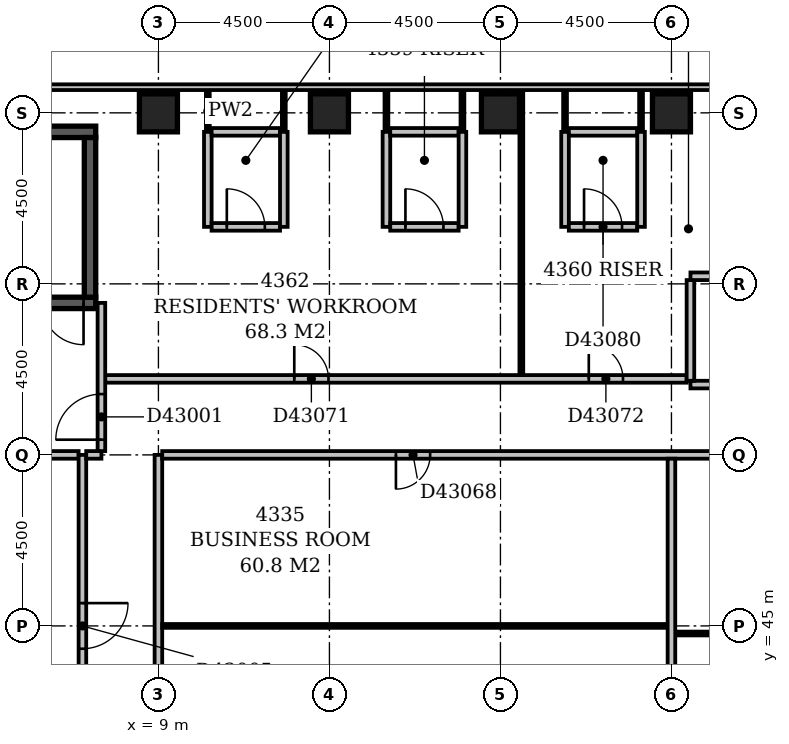
"""IFC4 building model, lengths in metres.
Left out: names, types, materials, properties, quantities, classifications, styles, units other than length and angle.
Written with IfcOpenShell. Run it as: python <this file> out.ifc"""

import sys

from ifc_helpers import new_model, si_unit, direction, frame, frame_2d, origin, origin_2d, place, context, subcontext, project, spatial, rectangle, extrude, element, fill, save


model = new_model("IFC4")
c1 = context("Model", 3, precision=1e-05, world=origin(), true_north=direction((0.0, 1.0)))
c2 = subcontext(c1, "Body", "Model", "MODEL_VIEW")
j1 = project(units=[si_unit("LENGTHUNIT", "METRE"), si_unit("PLANEANGLEUNIT", "RADIAN")], contexts=[c1])
p1 = place(None, origin())
s1 = spatial("IfcSite", under=j1, at=p1, CompositionType="ELEMENT")
p2 = place(p1, origin())
s2 = spatial("IfcBuilding", under=s1, at=p2, CompositionType="ELEMENT")
p3 = place(p2, frame((0.0, 0.0, 170.0)))
s3 = spatial("IfcBuildingStorey", under=s2, at=p3, CompositionType="ELEMENT", Elevation=170.0)
p4 = place(p3, frame((0.35, 53.5, -0.3), z_axis=(0.0, 0.0, 1.0), x_axis=(1.0, 0.0, 0.0)))
e1 = element("IfcWall", 1, at=p4, inside=s3, PredefinedType="SHEAR", context=c2, shape_type="SweptSolid", body=[
    extrude(rectangle(XDim=7.0, YDim=0.3, at=frame_2d((3.5, 0.0))), origin(), (0.0, 0.0, 1.0), 3.45),
])
p5 = place(p4, frame((5.58, 0.0, 0.3)))
e2 = element("IfcOpeningElement", 2, at=p5, cuts=e1, PredefinedType="OPENING", context=c2, shape_type="SweptSolid", body=[
    extrude(rectangle(XDim=1.1, YDim=2.1, at=frame_2d((0.55, 1.05))), frame((0.0, 0.162, 0.0), z_axis=(0.0, -1.0, 0.0), x_axis=(1.0, 0.0, 0.0)), (0.0, 0.0, 1.0), 0.324),
])
p6 = place(p3, frame((0.35, 58.0, -0.3), z_axis=(0.0, 0.0, 1.0), x_axis=(1.0, 0.0, 0.0)))
e3 = element("IfcWall", 3, at=p6, inside=s3, PredefinedType="SHEAR", context=c2, shape_type="SweptSolid", body=[
    extrude(rectangle(XDim=7.0, YDim=0.3, at=frame_2d((3.5, 0.0))), origin(), (0.0, 0.0, 1.0), 3.45),
])
p7 = place(p3, frame((7.2, 53.65, -0.3), z_axis=(0.0, 0.0, 1.0), x_axis=(0.0, 1.0, 0.0)))
e4 = element("IfcWall", 4, at=p7, inside=s3, PredefinedType="SHEAR", context=c2, shape_type="SweptSolid", body=[
    extrude(rectangle(XDim=4.2, YDim=0.3, at=frame_2d((2.1, 0.0))), origin(), (0.0, 0.0, 1.0), 3.45),
])
for number, where, z_axis, x_axis in (
    (5, (9.0, 58.5, -0.3), (0.0, 0.0, 1.0), (1.0, 0.0, 0.0)),
    (6, (13.5, 58.5, -0.3), (0.0, 0.0, 1.0), (1.0, 0.0, 0.0)),
    (7, (18.0, 58.5, -0.3), (0.0, 0.0, 1.0), (1.0, 0.0, 0.0)),
    (8, (22.5, 58.5, -0.3), (0.0, 0.0, 1.0), (1.0, 0.0, 0.0)),
):
    element("IfcColumn", number, at=place(p3, frame(where, z_axis=z_axis, x_axis=x_axis)), inside=s3, PredefinedType="COLUMN", context=c2, shape_type="SweptSolid", body=[
        extrude(rectangle(XDim=1.0, YDim=1.0, at=origin_2d()), origin(), (0.0, 0.0, 1.0), 3.45),
    ])
p8 = place(p3, frame((68.1, 59.175, 0.0), z_axis=(0.0, 0.0, 1.0), x_axis=(-1.0, 0.0, 0.0)))
e9 = element("IfcWall", 9, at=p8, inside=s3, PredefinedType="STANDARD", context=c2, shape_type="SweptSolid", body=[
    extrude(rectangle(XDim=68.85, YDim=0.15, at=frame_2d((34.425, 0.0))), origin(), (0.0, 0.0, 1.0), 2.5),
])
p9 = place(p8, frame((1.65, 0.0, 0.6)))
e10 = element("IfcOpeningElement", 10, at=p9, cuts=e9, PredefinedType="OPENING", context=c2, shape_type="SweptSolid", body=[
    extrude(rectangle(XDim=2.4, YDim=1.8, at=frame_2d((1.2, 0.9))), frame((0.0, 0.087, 0.0), z_axis=(0.0, -1.0, 0.0), x_axis=(1.0, 0.0, 0.0)), (0.0, 0.0, 1.0), 0.174),
])
p10 = place(p8, frame((5.823, 0.0, 0.6)))
e11 = element("IfcOpeningElement", 11, at=p10, cuts=e9, PredefinedType="OPENING", context=c2, shape_type="SweptSolid", body=[
    extrude(rectangle(XDim=2.1, YDim=1.8, at=frame_2d((1.05, 0.9))), frame((0.0, 0.087, 0.0), z_axis=(0.0, -1.0, 0.0), x_axis=(1.0, 0.0, 0.0)), (0.0, 0.0, 1.0), 0.174),
])
p11 = place(p8, frame((20.277, 0.0, 0.6)))
e12 = element("IfcOpeningElement", 12, at=p11, cuts=e9, PredefinedType="OPENING", context=c2, shape_type="SweptSolid", body=[
    extrude(rectangle(XDim=2.1, YDim=1.8, at=frame_2d((1.05, 0.9))), frame((0.0, 0.087, 0.0), z_axis=(0.0, -1.0, 0.0), x_axis=(1.0, 0.0, 0.0)), (0.0, 0.0, 1.0), 0.174),
])
p12 = place(p3, frame((7.0, 34.6, 0.0), z_axis=(0.0, 0.0, 1.0), x_axis=(0.0, 1.0, 0.0)))
e13 = element("IfcWall", 13, at=p12, inside=s3, PredefinedType="PARTITIONING", context=c2, shape_type="SweptSolid", body=[
    extrude(rectangle(XDim=14.9, YDim=0.2, at=frame_2d((7.45, 0.0))), origin(), (0.0, 0.0, 1.0), 3.15),
])
p13 = place(p12, frame((2.8, 0.0, 0.0)))
e14 = element("IfcOpeningElement", 14, at=p13, cuts=e13, PredefinedType="OPENING", context=c2, shape_type="SweptSolid", body=[
    extrude(rectangle(XDim=1.2, YDim=2.1, at=frame_2d((0.6, 1.05))), frame((0.0, 0.112, 0.0), z_axis=(0.0, -1.0, 0.0), x_axis=(1.0, 0.0, 0.0)), (0.0, 0.0, 1.0), 0.224),
])
p14 = place(p12, frame((9.8, 0.0, 0.0)))
e15 = element("IfcOpeningElement", 15, at=p14, cuts=e13, PredefinedType="OPENING", context=c2, shape_type="SweptSolid", body=[
    extrude(rectangle(XDim=1.2, YDim=2.1, at=frame_2d((0.6, 1.05))), frame((0.0, 0.112, 0.0), z_axis=(0.0, -1.0, 0.0), x_axis=(1.0, 0.0, 0.0)), (0.0, 0.0, 1.0), 0.224),
])
p15 = place(p3, frame((4.6, 49.5, 0.0), z_axis=(0.0, 0.0, 1.0), x_axis=(1.0, 0.0, 0.0)))
e16 = element("IfcWall", 16, at=p15, inside=s3, PredefinedType="PARTITIONING", context=c2, shape_type="SweptSolid", body=[
    extrude(rectangle(XDim=2.3, YDim=0.2, at=frame_2d((1.15, 0.0))), origin(), (0.0, 0.0, 1.0), 3.15),
])
p16 = place(p3, frame((23.0, 51.35, 0.0), z_axis=(0.0, 0.0, 1.0), x_axis=(1.0, 0.0, 0.0)))
e17 = element("IfcWall", 17, at=p16, inside=s3, PredefinedType="PARTITIONING", context=c2, shape_type="SweptSolid", body=[
    extrude(rectangle(XDim=4.8, YDim=0.2, at=frame_2d((2.4, 0.0))), origin(), (0.0, 0.0, 1.0), 3.15),
])
p17 = place(p16, frame((1.65, 0.0, 0.0)))
e18 = element("IfcOpeningElement", 18, at=p17, cuts=e17, PredefinedType="OPENING", context=c2, shape_type="SweptSolid", body=[
    extrude(rectangle(XDim=1.2, YDim=2.1, at=frame_2d((0.6, 1.05))), frame((0.0, 0.112, 0.0), z_axis=(0.0, -1.0, 0.0), x_axis=(1.0, 0.0, 0.0)), (0.0, 0.0, 1.0), 0.224),
])
p18 = place(p3, frame((23.0, 54.2, 0.0), z_axis=(0.0, 0.0, 1.0), x_axis=(1.0, 0.0, 0.0)))
e19 = element("IfcWall", 19, at=p18, inside=s3, PredefinedType="PARTITIONING", context=c2, shape_type="SweptSolid", body=[
    extrude(rectangle(XDim=0.9, YDim=0.2, at=frame_2d((0.45, 0.0))), origin(), (0.0, 0.0, 1.0), 3.15),
])
p19 = place(p3, frame((23.0, 51.45, 0.0), z_axis=(0.0, 0.0, 1.0), x_axis=(0.0, 1.0, 0.0)))
e20 = element("IfcWall", 20, at=p19, inside=s3, PredefinedType="PARTITIONING", context=c2, shape_type="SweptSolid", body=[
    extrude(rectangle(XDim=2.65, YDim=0.2, at=frame_2d((1.325, 0.0))), origin(), (0.0, 0.0, 1.0), 3.15),
])
p20 = place(p3, frame((7.1, 49.5, 0.0), z_axis=(0.0, 0.0, 1.0), x_axis=(1.0, 0.0, 0.0)))
e21 = element("IfcWall", 21, at=p20, inside=s3, PredefinedType="PARTITIONING", context=c2, shape_type="SweptSolid", body=[
    extrude(rectangle(XDim=0.4, YDim=0.2, at=frame_2d((0.2, 0.0))), origin(), (0.0, 0.0, 1.0), 3.15),
])
p21 = place(p3, frame((7.5, 49.6, 0.0), z_axis=(0.0, 0.0, 1.0), x_axis=(0.0, 1.0, 0.0)))
e22 = element("IfcWall", 22, at=p21, inside=s3, PredefinedType="PARTITIONING", context=c2, shape_type="SweptSolid", body=[
    extrude(rectangle(XDim=3.9, YDim=0.2, at=frame_2d((1.95, 0.0))), origin(), (0.0, 0.0, 1.0), 3.15),
])
p22 = place(p21, frame((0.3, 0.0, 0.0)))
e23 = element("IfcOpeningElement", 23, at=p22, cuts=e22, PredefinedType="OPENING", context=c2, shape_type="SweptSolid", body=[
    extrude(rectangle(XDim=1.2, YDim=2.1, at=frame_2d((0.6, 1.05))), frame((0.0, 0.112, 0.0), z_axis=(0.0, -1.0, 0.0), x_axis=(1.0, 0.0, 0.0)), (0.0, 0.0, 1.0), 0.224),
])
p23 = place(p3, frame((9.0, 34.75, 0.0), z_axis=(0.0, 0.0, 1.0), x_axis=(0.0, 1.0, 0.0)))
e24 = element("IfcWall", 24, at=p23, inside=s3, PredefinedType="PARTITIONING", context=c2, shape_type="SweptSolid", body=[
    extrude(rectangle(XDim=14.75, YDim=0.2, at=frame_2d((7.375, 0.0))), origin(), (0.0, 0.0, 1.0), 3.15),
])
p24 = place(p23, frame((3.0, 0.0, 0.0)))
e25 = element("IfcOpeningElement", 25, at=p24, cuts=e24, PredefinedType="OPENING", context=c2, shape_type="SweptSolid", body=[
    extrude(rectangle(XDim=0.9, YDim=2.1, at=frame_2d((0.45, 1.05))), frame((0.0, 0.112, 0.0), z_axis=(0.0, -1.0, 0.0), x_axis=(1.0, 0.0, 0.0)), (0.0, 0.0, 1.0), 0.224),
])
p25 = place(p23, frame((7.5, 0.0, 0.0)))
e26 = element("IfcOpeningElement", 26, at=p25, cuts=e24, PredefinedType="OPENING", context=c2, shape_type="SweptSolid", body=[
    extrude(rectangle(XDim=0.9, YDim=2.1, at=frame_2d((0.45, 1.05))), frame((0.0, 0.112, 0.0), z_axis=(0.0, -1.0, 0.0), x_axis=(1.0, 0.0, 0.0)), (0.0, 0.0, 1.0), 0.224),
])
p26 = place(p3, frame((22.5, 36.5, 0.0), z_axis=(0.0, 0.0, 1.0), x_axis=(0.0, 1.0, 0.0)))
e27 = element("IfcWall", 27, at=p26, inside=s3, PredefinedType="PARTITIONING", context=c2, shape_type="SweptSolid", body=[
    extrude(rectangle(XDim=12.9, YDim=0.2, at=frame_2d((6.45, 0.0))), origin(), (0.0, 0.0, 1.0), 3.15),
])
p27 = place(p3, frame((22.6, 44.8, 0.0), z_axis=(0.0, 0.0, 1.0), x_axis=(1.0, 0.0, 0.0)))
e28 = element("IfcWall", 28, at=p27, inside=s3, PredefinedType="PARTITIONING", context=c2, shape_type="SweptSolid", body=[
    extrude(rectangle(XDim=6.75, YDim=0.1, at=frame_2d((3.375, 0.0))), origin(), (0.0, 0.0, 1.0), 3.15),
])
p28 = place(p27, frame((2.9, 0.0, 0.0)))
e29 = element("IfcOpeningElement", 29, at=p28, cuts=e28, PredefinedType="OPENING", context=c2, shape_type="SweptSolid", body=[
    extrude(rectangle(XDim=0.9, YDim=2.1, at=frame_2d((0.45, 1.05))), frame((0.0, 0.062, 0.0), z_axis=(0.0, -1.0, 0.0), x_axis=(1.0, 0.0, 0.0)), (0.0, 0.0, 1.0), 0.124),
])
p29 = place(p3, frame((9.1, 45.0, 0.0), z_axis=(0.0, 0.0, 1.0), x_axis=(1.0, 0.0, 0.0)))
e30 = element("IfcWall", 30, at=p29, inside=s3, PredefinedType="PARTITIONING", context=c2, shape_type="SweptSolid", body=[
    extrude(rectangle(XDim=13.3, YDim=0.1, at=frame_2d((6.65, 0.0))), origin(), (0.0, 0.0, 1.0), 3.15),
])
p30 = place(p3, frame((9.1, 49.5, 0.0), z_axis=(0.0, 0.0, 1.0), x_axis=(1.0, 0.0, 0.0)))
e31 = element("IfcWall", 31, at=p30, inside=s3, PredefinedType="PARTITIONING", context=c2, shape_type="SweptSolid", body=[
    extrude(rectangle(XDim=32.55, YDim=0.2, at=frame_2d((16.275, 0.0))), origin(), (0.0, 0.0, 1.0), 3.15),
])
p31 = place(p30, frame((20.6, 0.0, 0.0)))
e32 = element("IfcOpeningElement", 32, at=p31, cuts=e31, PredefinedType="OPENING", context=c2, shape_type="SweptSolid", body=[
    extrude(rectangle(XDim=1.0, YDim=2.1, at=frame_2d((0.5, 1.05))), frame((0.0, 0.112, 0.0), z_axis=(0.0, -1.0, 0.0), x_axis=(1.0, 0.0, 0.0)), (0.0, 0.0, 1.0), 0.224),
])
p32 = place(p30, frame((6.15, 0.0, 0.0)))
e33 = element("IfcOpeningElement", 33, at=p32, cuts=e31, PredefinedType="OPENING", context=c2, shape_type="SweptSolid", body=[
    extrude(rectangle(XDim=0.9, YDim=2.1, at=frame_2d((0.45, 1.05))), frame((0.0, 0.112, 0.0), z_axis=(0.0, -1.0, 0.0), x_axis=(1.0, 0.0, 0.0)), (0.0, 0.0, 1.0), 0.224),
])
p33 = place(p3, frame((7.6, 51.5, 0.0), z_axis=(0.0, 0.0, 1.0), x_axis=(1.0, 0.0, 0.0)))
e34 = element("IfcWall", 34, at=p33, inside=s3, PredefinedType="PARTITIONING", context=c2, shape_type="SweptSolid", body=[
    extrude(rectangle(XDim=15.3, YDim=0.2, at=frame_2d((7.65, 0.0))), origin(), (0.0, 0.0, 1.0), 3.15),
])
p34 = place(p33, frame((4.975, 0.0, 0.0)))
e35 = element("IfcOpeningElement", 35, at=p34, cuts=e34, PredefinedType="OPENING", context=c2, shape_type="SweptSolid", body=[
    extrude(rectangle(XDim=0.9, YDim=2.1, at=frame_2d((0.45, 1.05))), frame((0.0, 0.112, 0.0), z_axis=(0.0, -1.0, 0.0), x_axis=(1.0, 0.0, 0.0)), (0.0, 0.0, 1.0), 0.224),
])
p35 = place(p33, frame((12.725, 0.0, 0.0)))
e36 = element("IfcOpeningElement", 36, at=p35, cuts=e34, PredefinedType="OPENING", context=c2, shape_type="SweptSolid", body=[
    extrude(rectangle(XDim=0.9, YDim=2.1, at=frame_2d((0.45, 1.05))), frame((0.0, 0.112, 0.0), z_axis=(0.0, -1.0, 0.0), x_axis=(1.0, 0.0, 0.0)), (0.0, 0.0, 1.0), 0.224),
])
p36 = place(p3, frame((18.55, 51.6, 0.0), z_axis=(0.0, 0.0, 1.0), x_axis=(0.0, 1.0, 0.0)))
e37 = element("IfcWall", 37, at=p36, inside=s3, PredefinedType="PARTITIONING", context=c2, shape_type="SweptSolid", body=[
    extrude(rectangle(XDim=7.5, YDim=0.1, at=frame_2d((3.75, 0.0))), origin(), (0.0, 0.0, 1.0), 3.15),
])
p37 = place(p3, frame((10.3, 55.5, 0.0), z_axis=(0.0, 0.0, 1.0), x_axis=(0.0, 1.0, 0.0)))
e38 = element("IfcWall", 38, at=p37, inside=s3, PredefinedType="PARTITIONING", context=c2, shape_type="SweptSolid", body=[
    extrude(rectangle(XDim=2.5, YDim=0.2, at=frame_2d((1.25, 0.0))), origin(), (0.0, 0.0, 1.0), 3.15),
])
p38 = place(p3, frame((10.4, 55.5, 0.0), z_axis=(0.0, 0.0, 1.0), x_axis=(1.0, 0.0, 0.0)))
e39 = element("IfcWall", 39, at=p38, inside=s3, PredefinedType="PARTITIONING", context=c2, shape_type="SweptSolid", body=[
    extrude(rectangle(XDim=1.8, YDim=0.2, at=frame_2d((0.9, 0.0))), origin(), (0.0, 0.0, 1.0), 3.15),
])
p39 = place(p38, frame((0.4, 0.0, 0.0)))
e40 = element("IfcOpeningElement", 40, at=p39, cuts=e39, PredefinedType="OPENING", context=c2, shape_type="SweptSolid", body=[
    extrude(rectangle(XDim=1.0, YDim=2.1, at=frame_2d((0.5, 1.05))), frame((0.0, 0.112, 0.0), z_axis=(0.0, -1.0, 0.0), x_axis=(1.0, 0.0, 0.0)), (0.0, 0.0, 1.0), 0.224),
])
for number, where, z_axis, x_axis in (
    (41, (12.3, 55.5, 0.0), (0.0, 0.0, 1.0), (0.0, 1.0, 0.0)),
    (42, (15.0, 55.5, 0.0), (0.0, 0.0, 1.0), (0.0, 1.0, 0.0)),
):
    element("IfcWall", number, at=place(p3, frame(where, z_axis=z_axis, x_axis=x_axis)), inside=s3, PredefinedType="PARTITIONING", context=c2, shape_type="SweptSolid", body=[
        extrude(rectangle(XDim=2.5, YDim=0.2, at=frame_2d((1.25, 0.0))), origin(), (0.0, 0.0, 1.0), 3.15),
    ])
p40 = place(p3, frame((15.1, 55.5, 0.0), z_axis=(0.0, 0.0, 1.0), x_axis=(1.0, 0.0, 0.0)))
e43 = element("IfcWall", 43, at=p40, inside=s3, PredefinedType="PARTITIONING", context=c2, shape_type="SweptSolid", body=[
    extrude(rectangle(XDim=1.8, YDim=0.2, at=frame_2d((0.9, 0.0))), origin(), (0.0, 0.0, 1.0), 3.15),
])
p41 = place(p40, frame((0.4, 0.0, 0.0)))
e44 = element("IfcOpeningElement", 44, at=p41, cuts=e43, PredefinedType="OPENING", context=c2, shape_type="SweptSolid", body=[
    extrude(rectangle(XDim=1.0, YDim=2.1, at=frame_2d((0.5, 1.05))), frame((0.0, 0.112, 0.0), z_axis=(0.0, -1.0, 0.0), x_axis=(1.0, 0.0, 0.0)), (0.0, 0.0, 1.0), 0.224),
])
for number, where, z_axis, x_axis in (
    (45, (17.0, 55.5, 0.0), (0.0, 0.0, 1.0), (0.0, 1.0, 0.0)),
    (46, (19.7, 55.5, 0.0), (0.0, 0.0, 1.0), (0.0, 1.0, 0.0)),
):
    element("IfcWall", number, at=place(p3, frame(where, z_axis=z_axis, x_axis=x_axis)), inside=s3, PredefinedType="PARTITIONING", context=c2, shape_type="SweptSolid", body=[
        extrude(rectangle(XDim=2.5, YDim=0.2, at=frame_2d((1.25, 0.0))), origin(), (0.0, 0.0, 1.0), 3.15),
    ])
p42 = place(p3, frame((19.8, 55.5, 0.0), z_axis=(0.0, 0.0, 1.0), x_axis=(1.0, 0.0, 0.0)))
e47 = element("IfcWall", 47, at=p42, inside=s3, PredefinedType="PARTITIONING", context=c2, shape_type="SweptSolid", body=[
    extrude(rectangle(XDim=1.8, YDim=0.2, at=frame_2d((0.9, 0.0))), origin(), (0.0, 0.0, 1.0), 3.15),
])
p43 = place(p42, frame((0.4, 0.0, 0.0)))
e48 = element("IfcOpeningElement", 48, at=p43, cuts=e47, PredefinedType="OPENING", context=c2, shape_type="SweptSolid", body=[
    extrude(rectangle(XDim=1.0, YDim=2.1, at=frame_2d((0.5, 1.05))), frame((0.0, 0.112, 0.0), z_axis=(0.0, -1.0, 0.0), x_axis=(1.0, 0.0, 0.0)), (0.0, 0.0, 1.0), 0.224),
])
p44 = place(p3, frame((21.7, 55.5, 0.0), z_axis=(0.0, 0.0, 1.0), x_axis=(0.0, 1.0, 0.0)))
e49 = element("IfcWall", 49, at=p44, inside=s3, PredefinedType="PARTITIONING", context=c2, shape_type="SweptSolid", body=[
    extrude(rectangle(XDim=2.5, YDim=0.2, at=frame_2d((1.25, 0.0))), origin(), (0.0, 0.0, 1.0), 3.15),
])
p45 = place(p3, frame((10.3, 58.0, 0.0), z_axis=(0.0, 0.0, 1.0), x_axis=(0.0, 1.0, 0.0)))
e50 = element("IfcWall", 50, at=p45, inside=s3, PredefinedType="PARTITIONING", context=c2, shape_type="SweptSolid", body=[
    extrude(rectangle(XDim=1.1, YDim=0.1, at=frame_2d((0.55, 0.0))), origin(), (0.0, 0.0, 1.0), 3.15),
])
p46 = place(p3, frame((10.4, 58.0, 0.0), z_axis=(0.0, 0.0, 1.0), x_axis=(1.0, 0.0, 0.0)))
e51 = element("IfcWall", 51, at=p46, inside=s3, PredefinedType="PARTITIONING", context=c2, shape_type="SweptSolid", body=[
    extrude(rectangle(XDim=1.8, YDim=0.2, at=frame_2d((0.9, 0.0))), origin(), (0.0, 0.0, 1.0), 3.15),
])
for number, where, z_axis, x_axis in (
    (52, (12.3, 58.0, 0.0), (0.0, 0.0, 1.0), (0.0, 1.0, 0.0)),
    (53, (15.0, 58.0, 0.0), (0.0, 0.0, 1.0), (0.0, 1.0, 0.0)),
):
    element("IfcWall", number, at=place(p3, frame(where, z_axis=z_axis, x_axis=x_axis)), inside=s3, PredefinedType="PARTITIONING", context=c2, shape_type="SweptSolid", body=[
        extrude(rectangle(XDim=1.1, YDim=0.1, at=frame_2d((0.55, 0.0))), origin(), (0.0, 0.0, 1.0), 3.15),
    ])
p47 = place(p3, frame((15.1, 58.0, 0.0), z_axis=(0.0, 0.0, 1.0), x_axis=(1.0, 0.0, 0.0)))
e54 = element("IfcWall", 54, at=p47, inside=s3, PredefinedType="PARTITIONING", context=c2, shape_type="SweptSolid", body=[
    extrude(rectangle(XDim=1.8, YDim=0.2, at=frame_2d((0.9, 0.0))), origin(), (0.0, 0.0, 1.0), 3.15),
])
for number, where, z_axis, x_axis in (
    (55, (17.0, 58.0, 0.0), (0.0, 0.0, 1.0), (0.0, 1.0, 0.0)),
    (56, (19.7, 58.0, 0.0), (0.0, 0.0, 1.0), (0.0, 1.0, 0.0)),
):
    element("IfcWall", number, at=place(p3, frame(where, z_axis=z_axis, x_axis=x_axis)), inside=s3, PredefinedType="PARTITIONING", context=c2, shape_type="SweptSolid", body=[
        extrude(rectangle(XDim=1.1, YDim=0.1, at=frame_2d((0.55, 0.0))), origin(), (0.0, 0.0, 1.0), 3.15),
    ])
p48 = place(p3, frame((19.8, 58.0, 0.0), z_axis=(0.0, 0.0, 1.0), x_axis=(1.0, 0.0, 0.0)))
e57 = element("IfcWall", 57, at=p48, inside=s3, PredefinedType="PARTITIONING", context=c2, shape_type="SweptSolid", body=[
    extrude(rectangle(XDim=1.8, YDim=0.2, at=frame_2d((0.9, 0.0))), origin(), (0.0, 0.0, 1.0), 3.15),
])
p49 = place(p3, frame((21.7, 58.0, 0.0), z_axis=(0.0, 0.0, 1.0), x_axis=(0.0, 1.0, 0.0)))
e58 = element("IfcWall", 58, at=p49, inside=s3, PredefinedType="PARTITIONING", context=c2, shape_type="SweptSolid", body=[
    extrude(rectangle(XDim=1.1, YDim=0.1, at=frame_2d((0.55, 0.0))), origin(), (0.0, 0.0, 1.0), 3.15),
])
p50 = place(p22, origin())
e59 = element("IfcDoor", 59, at=p50, inside=s3, OperationType="SINGLE_SWING_LEFT", PredefinedType="DOOR", context=c2, shape_type="SweptSolid", body=[
    extrude(rectangle(XDim=1.2, YDim=2.1, at=frame_2d((0.6, 1.05))), frame((0.0, 0.025, 0.0), z_axis=(0.0, -1.0, 0.0), x_axis=(1.0, 0.0, 0.0)), (0.0, 0.0, 1.0), 0.05),
])
fill(e23, e59)
p51 = place(p14, origin())
e60 = element("IfcDoor", 60, at=p51, inside=s3, OperationType="SINGLE_SWING_RIGHT", PredefinedType="DOOR", context=c2, shape_type="SweptSolid", body=[
    extrude(rectangle(XDim=1.2, YDim=2.1, at=frame_2d((0.6, 1.05))), frame((0.0, 0.025, 0.0), z_axis=(0.0, -1.0, 0.0), x_axis=(1.0, 0.0, 0.0)), (0.0, 0.0, 1.0), 0.05),
])
fill(e15, e60)
p52 = place(p5, origin())
e61 = element("IfcDoor", 61, at=p52, inside=s3, OperationType="SINGLE_SWING_RIGHT", PredefinedType="DOOR", context=c2, shape_type="SweptSolid", body=[
    extrude(rectangle(XDim=1.1, YDim=2.1, at=frame_2d((0.55, 1.05))), frame((0.0, 0.025, 0.0), z_axis=(0.0, -1.0, 0.0), x_axis=(1.0, 0.0, 0.0)), (0.0, 0.0, 1.0), 0.05),
])
fill(e2, e61)
p53 = place(p32, frame((0.9, 0.0, 0.0), z_axis=(0.0, 0.0, 1.0), x_axis=(-1.0, 0.0, 0.0)))
e62 = element("IfcDoor", 62, at=p53, inside=s3, OperationType="SINGLE_SWING_RIGHT", PredefinedType="DOOR", context=c2, shape_type="SweptSolid", body=[
    extrude(rectangle(XDim=0.9, YDim=2.1, at=frame_2d((0.45, 1.05))), frame((0.0, 0.025, 0.0), z_axis=(0.0, -1.0, 0.0), x_axis=(1.0, 0.0, 0.0)), (0.0, 0.0, 1.0), 0.05),
])
fill(e33, e62)
p54 = place(p34, origin())
e63 = element("IfcDoor", 63, at=p54, inside=s3, OperationType="SINGLE_SWING_LEFT", PredefinedType="DOOR", context=c2, shape_type="SweptSolid", body=[
    extrude(rectangle(XDim=0.9, YDim=2.1, at=frame_2d((0.45, 1.05))), frame((0.0, 0.025, 0.0), z_axis=(0.0, -1.0, 0.0), x_axis=(1.0, 0.0, 0.0)), (0.0, 0.0, 1.0), 0.05),
])
fill(e35, e63)
p55 = place(p35, origin())
e64 = element("IfcDoor", 64, at=p55, inside=s3, OperationType="SINGLE_SWING_LEFT", PredefinedType="DOOR", context=c2, shape_type="SweptSolid", body=[
    extrude(rectangle(XDim=0.9, YDim=2.1, at=frame_2d((0.45, 1.05))), frame((0.0, 0.025, 0.0), z_axis=(0.0, -1.0, 0.0), x_axis=(1.0, 0.0, 0.0)), (0.0, 0.0, 1.0), 0.05),
])
fill(e36, e64)
p56 = place(p39, origin())
e65 = element("IfcDoor", 65, at=p56, inside=s3, OperationType="SINGLE_SWING_LEFT", PredefinedType="DOOR", context=c2, shape_type="SweptSolid", body=[
    extrude(rectangle(XDim=1.0, YDim=2.1, at=frame_2d((0.5, 1.05))), frame((0.0, 0.025, 0.0), z_axis=(0.0, -1.0, 0.0), x_axis=(1.0, 0.0, 0.0)), (0.0, 0.0, 1.0), 0.05),
])
fill(e40, e65)
p57 = place(p41, origin())
e66 = element("IfcDoor", 66, at=p57, inside=s3, OperationType="SINGLE_SWING_LEFT", PredefinedType="DOOR", context=c2, shape_type="SweptSolid", body=[
    extrude(rectangle(XDim=1.0, YDim=2.1, at=frame_2d((0.5, 1.05))), frame((0.0, 0.025, 0.0), z_axis=(0.0, -1.0, 0.0), x_axis=(1.0, 0.0, 0.0)), (0.0, 0.0, 1.0), 0.05),
])
fill(e44, e66)
p58 = place(p43, origin())
e67 = element("IfcDoor", 67, at=p58, inside=s3, OperationType="SINGLE_SWING_LEFT", PredefinedType="DOOR", context=c2, shape_type="SweptSolid", body=[
    extrude(rectangle(XDim=1.0, YDim=2.1, at=frame_2d((0.5, 1.05))), frame((0.0, 0.025, 0.0), z_axis=(0.0, -1.0, 0.0), x_axis=(1.0, 0.0, 0.0)), (0.0, 0.0, 1.0), 0.05),
])
fill(e48, e67)
save(model, sys.argv[1])
